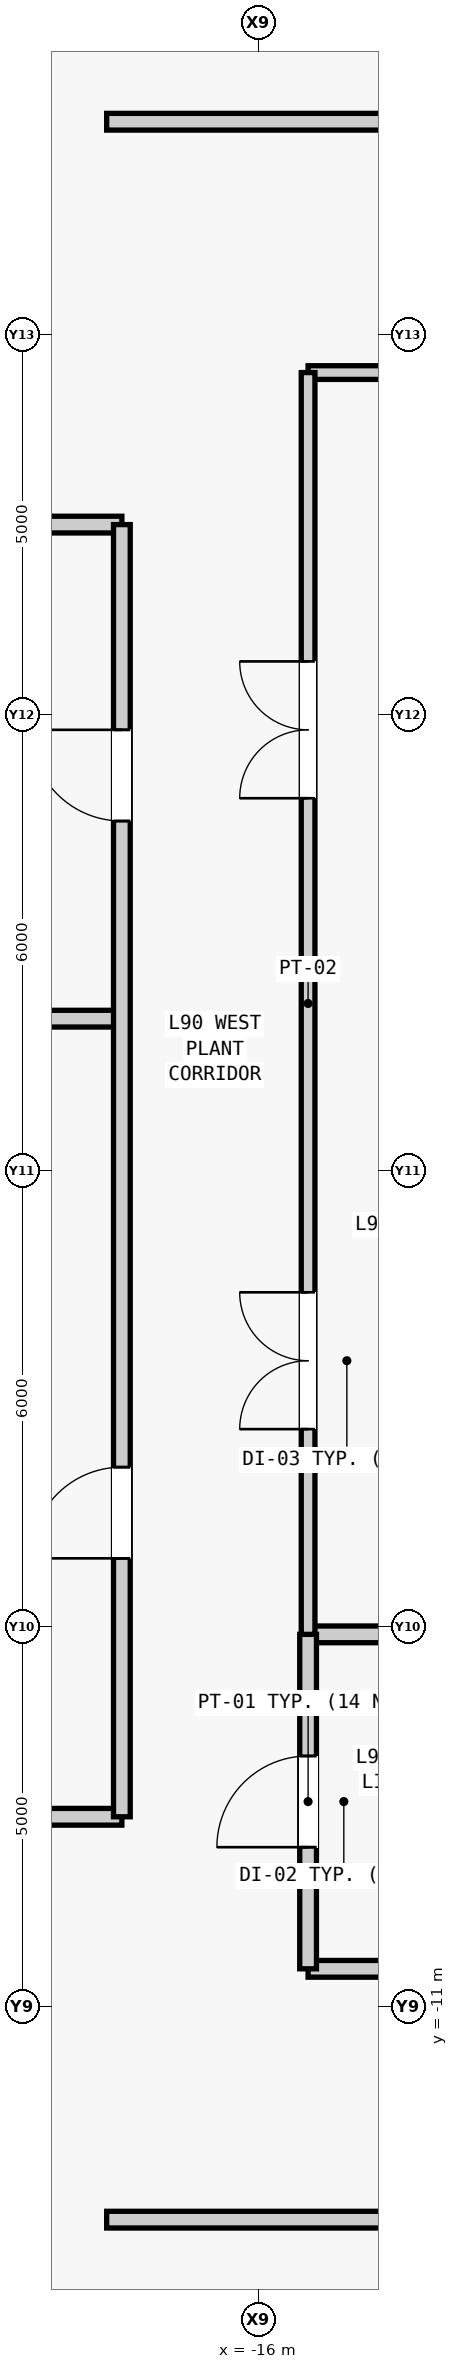
"""IFC4 building model, lengths in metres.
Left out: names, types, materials, properties, quantities, classifications, styles, units other than length and angle.
Written with IfcOpenShell. Run it as: python <this file> out.ifc"""

import sys

from ifc_helpers import new_model, si_unit, direction, frame, frame_2d, origin, place, context, subcontext, project, spatial, rectangle, extrude, source, transform, mapped, element, fill, save


model = new_model("IFC4")
c1 = context("Model", 3, precision=1e-05, world=origin(), true_north=direction((0.0, 1.0)))
c2 = subcontext(c1, "Body", "Model", "MODEL_VIEW")
j1 = project(units=[si_unit("LENGTHUNIT", "METRE"), si_unit("PLANEANGLEUNIT", "RADIAN")], contexts=[c1])
p1 = place(None, origin())
s1 = spatial("IfcSite", under=j1, at=p1, CompositionType="ELEMENT")
p2 = place(p1, origin())
s2 = spatial("IfcBuilding", under=s1, at=p2, CompositionType="ELEMENT")
p3 = place(p2, frame((0.0, 0.0, 380.3)))
s3 = spatial("IfcBuildingStorey", under=s2, at=p3, CompositionType="ELEMENT", Elevation=380.3)
m1 = source(origin(), c2, "Body", "SweptSolid", [
    extrude(rectangle(XDim=4.05, YDim=0.22, at=frame_2d((2.025, 0.0))), origin(), (0.0, 0.0, 1.0), 4.45),
])
p4 = place(p3, frame((-15.35, -10.5, 0.0), z_axis=(0.0, 0.0, 1.0), x_axis=(1.0, 0.0, 0.0)))
e1 = element("IfcWall", 1, at=p4, inside=s3, PredefinedType="PARTITIONING", context=c2, shape_type="MappedRepresentation", body=[
    mapped(m1, transform((0.0, 0.0, 0.0), scale=1.0)),
])
m2 = source(origin(), c2, "Body", "SweptSolid", [
    extrude(rectangle(XDim=4.05, YDim=0.22, at=frame_2d((2.025, 0.0))), origin(), (0.0, 0.0, 1.0), 3.901),
])
p5 = place(p3, frame((-15.35, -6.1, 0.0), z_axis=(0.0, 0.0, 1.0), x_axis=(1.0, 0.0, 0.0)))
e2 = element("IfcWall", 2, at=p5, inside=s3, PredefinedType="PARTITIONING", context=c2, shape_type="MappedRepresentation", body=[
    mapped(m2, transform((0.0, 0.0, 0.0), scale=1.0)),
])
m3 = source(origin(), c2, "Body", "SweptSolid", [
    extrude(rectangle(XDim=4.4, YDim=0.22, at=frame_2d((2.2, 0.0))), origin(), (0.0, 0.0, 1.0), 4.45),
])
p6 = place(p3, frame((-15.35, -10.5, 0.0), z_axis=(0.0, 0.0, 1.0), x_axis=(0.0, 1.0, 0.0)))
e3 = element("IfcWall", 3, at=p6, inside=s3, PredefinedType="PARTITIONING", context=c2, shape_type="MappedRepresentation", body=[
    mapped(m3, transform((0.0, 0.0, 0.0), scale=1.0)),
])
m4 = source(origin(), c2, "Body", "SweptSolid", [
    extrude(rectangle(XDim=1.2, YDim=2.2, at=frame_2d((0.6, 1.1))), frame((0.0, 0.12, 0.0), z_axis=(0.0, -1.0, 0.0), x_axis=(1.0, 0.0, 0.0)), (0.0, 0.0, 1.0), 0.24),
])
p7 = place(p6, frame((1.6, 0.0, 0.0)))
e4 = element("IfcOpeningElement", 4, at=p7, cuts=e3, PredefinedType="OPENING", context=c2, shape_type="MappedRepresentation", body=[
    mapped(m4, transform((0.0, 0.0, 0.0), scale=1.0)),
])
m5 = source(origin(), c2, "Body", "SweptSolid", [
    extrude(rectangle(XDim=4.05, YDim=0.18, at=frame_2d((2.025, 0.0))), origin(), (0.0, 0.0, 1.0), 4.45),
])
p8 = place(p3, frame((-15.35, 10.5, 0.0), z_axis=(0.0, 0.0, 1.0), x_axis=(1.0, 0.0, 0.0)))
e5 = element("IfcWall", 5, at=p8, inside=s3, PredefinedType="PARTITIONING", context=c2, shape_type="MappedRepresentation", body=[
    mapped(m5, transform((0.0, 0.0, 0.0), scale=1.0)),
])
m6 = source(origin(), c2, "Body", "SweptSolid", [
    extrude(rectangle(XDim=16.6, YDim=0.18, at=frame_2d((8.3, 0.0))), origin(), (0.0, 0.0, 1.0), 4.45),
])
p9 = place(p3, frame((-15.35, -6.1, 0.0), z_axis=(0.0, 0.0, 1.0), x_axis=(0.0, 1.0, 0.0)))
e6 = element("IfcWall", 6, at=p9, inside=s3, PredefinedType="PARTITIONING", context=c2, shape_type="MappedRepresentation", body=[
    mapped(m6, transform((0.0, 0.0, 0.0), scale=1.0)),
])
m7 = source(origin(), c2, "Body", "SweptSolid", [
    extrude(rectangle(XDim=1.8, YDim=2.25, at=frame_2d((0.9, 1.125))), frame((0.0, 0.1, 0.0), z_axis=(0.0, -1.0, 0.0), x_axis=(1.0, 0.0, 0.0)), (0.0, 0.0, 1.0), 0.2),
])
p10 = place(p9, frame((2.7, 0.0, 0.0)))
e7 = element("IfcOpeningElement", 7, at=p10, cuts=e6, PredefinedType="OPENING", context=c2, shape_type="MappedRepresentation", body=[
    mapped(m7, transform((0.0, 0.0, 0.0), scale=1.0)),
])
p11 = place(p9, frame((11.0, 0.0, 0.0)))
e8 = element("IfcOpeningElement", 8, at=p11, cuts=e6, PredefinedType="OPENING", context=c2, shape_type="MappedRepresentation", body=[
    mapped(m7, transform((0.0, 0.0, 0.0), scale=1.0)),
])
m8 = source(origin(), c2, "Body", "SweptSolid", [
    extrude(rectangle(XDim=36.0, YDim=0.22, at=frame_2d((18.0, 0.0))), origin(), (0.0, 0.0, 1.0), 4.45),
])
p12 = place(p3, frame((-18.0, -13.8, 0.0), z_axis=(0.0, 0.0, 1.0), x_axis=(1.0, 0.0, 0.0)))
e9 = element("IfcWall", 9, at=p12, inside=s3, PredefinedType="PARTITIONING", context=c2, shape_type="MappedRepresentation", body=[
    mapped(m8, transform((0.0, 0.0, 0.0), scale=1.0)),
])
m9 = source(origin(), c2, "Body", "SweptSolid", [
    extrude(rectangle(XDim=1.5, YDim=2.3, at=frame_2d((0.75, 1.15))), frame((0.0, 0.12, 0.0), z_axis=(0.0, -1.0, 0.0), x_axis=(1.0, 0.0, 0.0)), (0.0, 0.0, 1.0), 0.24),
])
p13 = place(p12, frame((9.8, 0.0, 0.0)))
e10 = element("IfcOpeningElement", 10, at=p13, cuts=e9, PredefinedType="OPENING", context=c2, shape_type="MappedRepresentation", body=[
    mapped(m9, transform((0.0, 0.0, 0.0), scale=1.0)),
])
p14 = place(p12, frame((22.8, 0.0, 0.0)))
e11 = element("IfcOpeningElement", 11, at=p14, cuts=e9, PredefinedType="OPENING", context=c2, shape_type="MappedRepresentation", body=[
    mapped(m9, transform((0.0, 0.0, 0.0), scale=1.0)),
])
p15 = place(p3, frame((-18.0, 13.8, 0.0), z_axis=(0.0, 0.0, 1.0), x_axis=(1.0, 0.0, 0.0)))
e12 = element("IfcWall", 12, at=p15, inside=s3, PredefinedType="PARTITIONING", context=c2, shape_type="MappedRepresentation", body=[
    mapped(m8, transform((0.0, 0.0, 0.0), scale=1.0)),
])
p16 = place(p15, frame((8.15, 0.0, 0.0)))
e13 = element("IfcOpeningElement", 13, at=p16, cuts=e12, PredefinedType="OPENING", context=c2, shape_type="MappedRepresentation", body=[
    mapped(m9, transform((0.0, 0.0, 0.0), scale=1.0)),
])
p17 = place(p15, frame((16.55, 0.0, 0.0)))
e14 = element("IfcOpeningElement", 14, at=p17, cuts=e12, PredefinedType="OPENING", context=c2, shape_type="MappedRepresentation", body=[
    mapped(m9, transform((0.0, 0.0, 0.0), scale=1.0)),
])
p18 = place(p15, frame((26.3, 0.0, 0.0)))
e15 = element("IfcOpeningElement", 15, at=p18, cuts=e12, PredefinedType="OPENING", context=c2, shape_type="MappedRepresentation", body=[
    mapped(m9, transform((0.0, 0.0, 0.0), scale=1.0)),
])
m10 = source(origin(), c2, "Body", "SweptSolid", [
    extrude(rectangle(XDim=6.2, YDim=0.22, at=frame_2d((3.1, 0.0))), origin(), (0.0, 0.0, 1.0), 4.45),
])
for number, where, z_axis, x_axis in (
    (16, (-24.0, 2.0, 0.0), (0.0, 0.0, 1.0), (1.0, 0.0, 0.0)),
    (17, (-24.0, -8.5, 0.0), (0.0, 0.0, 1.0), (1.0, 0.0, 0.0)),
    (18, (-24.0, 8.5, 0.0), (0.0, 0.0, 1.0), (1.0, 0.0, 0.0)),
):
    element("IfcWall", number, at=place(p3, frame(where, z_axis=z_axis, x_axis=x_axis)), inside=s3, PredefinedType="PARTITIONING", context=c2, shape_type="MappedRepresentation", body=[
        mapped(m10, transform((0.0, 0.0, 0.0), scale=1.0)),
    ])
m11 = source(origin(), c2, "Body", "SweptSolid", [
    extrude(rectangle(XDim=17.0, YDim=0.22, at=frame_2d((8.5, 0.0))), origin(), (0.0, 0.0, 1.0), 4.45),
])
p19 = place(p3, frame((-17.8, -8.5, 0.0), z_axis=(0.0, 0.0, 1.0), x_axis=(0.0, 1.0, 0.0)))
e19 = element("IfcWall", 19, at=p19, inside=s3, PredefinedType="PARTITIONING", context=c2, shape_type="MappedRepresentation", body=[
    mapped(m11, transform((0.0, 0.0, 0.0), scale=1.0)),
])
p20 = place(p19, frame((3.4, 0.0, 0.0)))
e20 = element("IfcOpeningElement", 20, at=p20, cuts=e19, PredefinedType="OPENING", context=c2, shape_type="MappedRepresentation", body=[
    mapped(m4, transform((0.0, 0.0, 0.0), scale=1.0)),
])
p21 = place(p19, frame((13.1, 0.0, 0.0)))
e21 = element("IfcOpeningElement", 21, at=p21, cuts=e19, PredefinedType="OPENING", context=c2, shape_type="MappedRepresentation", body=[
    mapped(m4, transform((0.0, 0.0, 0.0), scale=1.0)),
])
m12 = source(origin(), c2, "Body", "SweptSolid", [
    extrude(rectangle(XDim=1.2, YDim=2.2, at=frame_2d((0.6, 1.1))), frame((0.0, 0.025, 0.0), z_axis=(0.0, -1.0, 0.0), x_axis=(1.0, 0.0, 0.0)), (0.0, 0.0, 1.0), 0.05),
])
p22 = place(p7, origin())
e22 = element("IfcDoor", 22, at=p22, inside=s3, OperationType="SINGLE_SWING_LEFT", PredefinedType="DOOR", context=c2, shape_type="MappedRepresentation", body=[
    mapped(m12, transform((0.0, 0.0, 0.0), scale=1.0)),
])
fill(e4, e22)
m13 = source(origin(), c2, "Body", "SweptSolid", [
    extrude(rectangle(XDim=1.8, YDim=2.25, at=frame_2d((0.9, 1.125))), frame((0.0, 0.025, 0.0), z_axis=(0.0, -1.0, 0.0), x_axis=(1.0, 0.0, 0.0)), (0.0, 0.0, 1.0), 0.05),
])
p23 = place(p10, origin())
e23 = element("IfcDoor", 23, at=p23, inside=s3, OperationType="SINGLE_SWING_LEFT", PredefinedType="DOOR", context=c2, shape_type="MappedRepresentation", body=[
    mapped(m13, transform((0.0, 0.0, 0.0), scale=1.0)),
])
fill(e7, e23)
p24 = place(p11, origin())
e24 = element("IfcDoor", 24, at=p24, inside=s3, OperationType="SINGLE_SWING_RIGHT", PredefinedType="DOOR", context=c2, shape_type="MappedRepresentation", body=[
    mapped(m13, transform((0.0, 0.0, 0.0), scale=1.0)),
])
fill(e8, e24)
p25 = place(p20, origin())
e25 = element("IfcDoor", 25, at=p25, inside=s3, OperationType="SINGLE_SWING_LEFT", PredefinedType="DOOR", context=c2, shape_type="MappedRepresentation", body=[
    mapped(m12, transform((0.0, 0.0, 0.0), scale=1.0)),
])
fill(e20, e25)
p26 = place(p21, origin())
e26 = element("IfcDoor", 26, at=p26, inside=s3, OperationType="SINGLE_SWING_RIGHT", PredefinedType="DOOR", context=c2, shape_type="MappedRepresentation", body=[
    mapped(m12, transform((0.0, 0.0, 0.0), scale=1.0)),
])
fill(e21, e26)
save(model, sys.argv[1])
